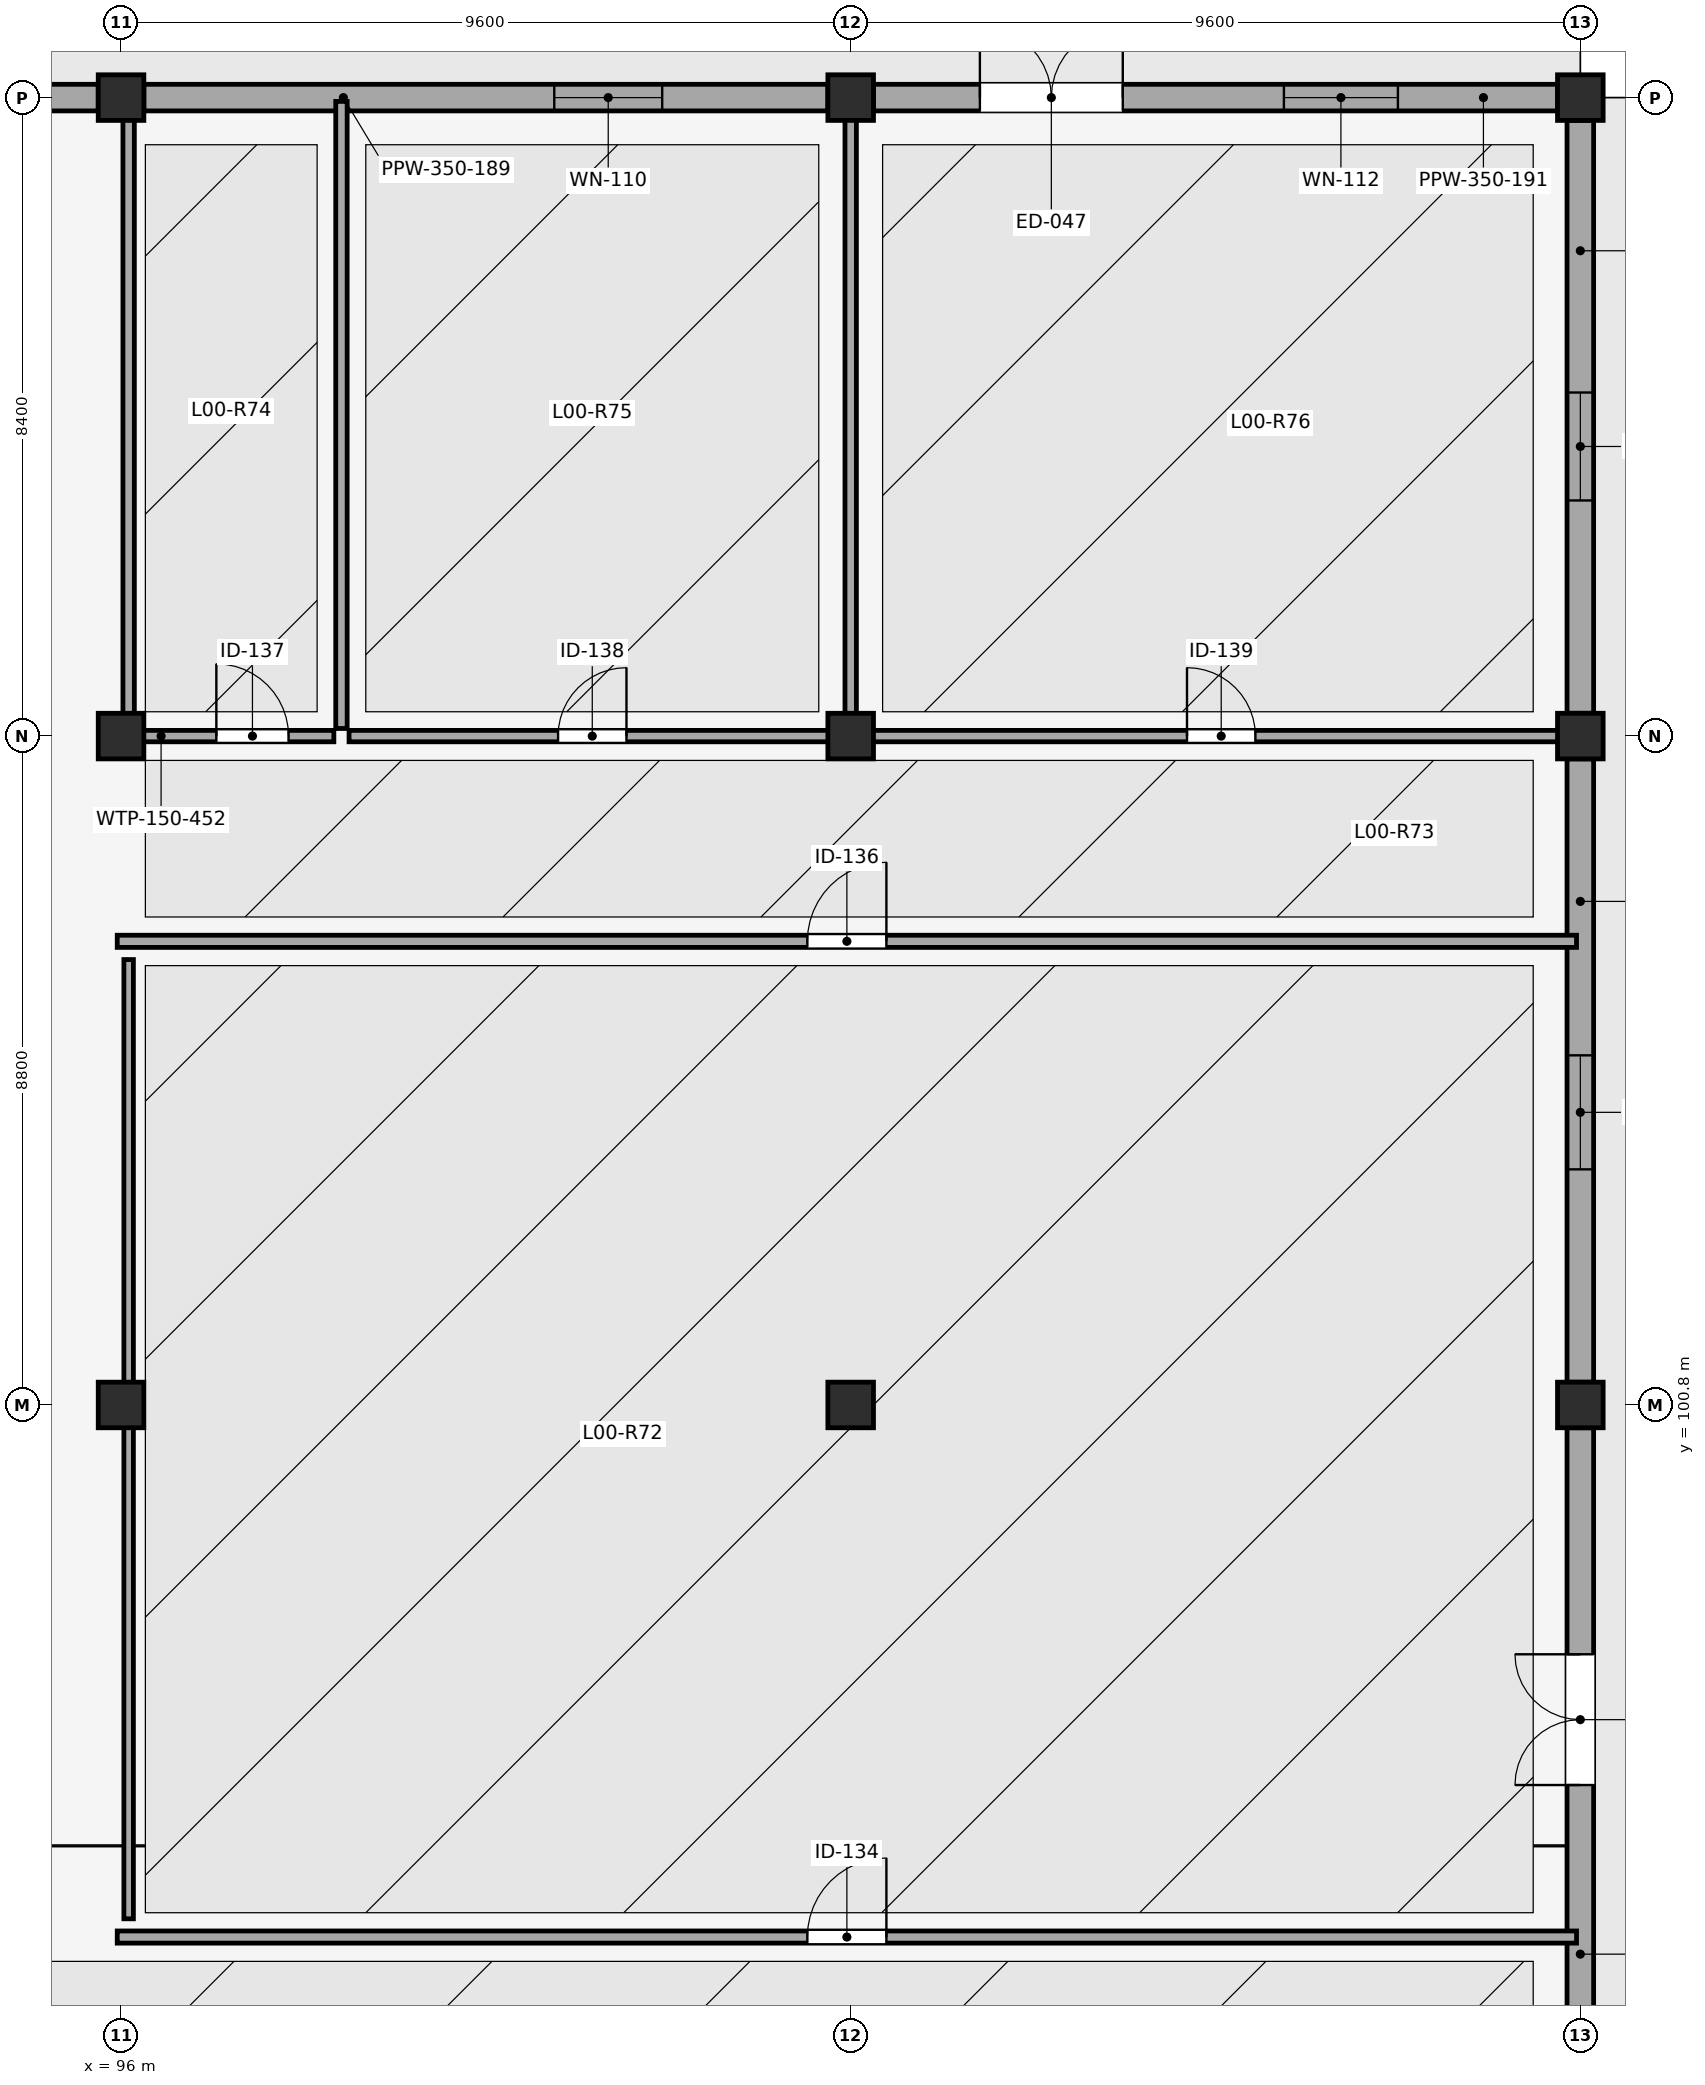
"""IFC4 building model, lengths in metres.
Left out: names, types, materials, properties, quantities, classifications, styles, units other than length and angle.
Written with IfcOpenShell. Run it as: python <this file> out.ifc"""

import sys

from ifc_helpers import new_model, si_unit, direction, frame, frame_2d, origin, origin_2d, place, context, subcontext, project, spatial, rectangle, extrude, element, fill, save


model = new_model("IFC4")
c1 = context("Model", 3, precision=1e-05, world=origin(), true_north=direction((0.0, 1.0)))
c2 = subcontext(c1, "Body", "Model", "MODEL_VIEW")
j1 = project(units=[si_unit("LENGTHUNIT", "METRE"), si_unit("PLANEANGLEUNIT", "RADIAN")], contexts=[c1])
p1 = place(None, origin())
s1 = spatial("IfcSite", under=j1, at=p1, CompositionType="ELEMENT")
p2 = place(p1, origin())
s2 = spatial("IfcBuilding", under=s1, at=p2, CompositionType="ELEMENT")
p3 = place(p2, origin())
s3 = spatial("IfcBuildingStorey", under=s2, at=p3, CompositionType="ELEMENT", Elevation=0.0)
for number, where, z_axis, x_axis in (
    (1, (96.0, 100.8, 0.0), (0.0, 0.0, 1.0), (1.0, 0.0, 0.0)),
    (2, (96.0, 109.6, 0.0), (0.0, 0.0, 1.0), (1.0, 0.0, 0.0)),
    (3, (96.0, 118.0, 0.0), (0.0, 0.0, 1.0), (1.0, 0.0, 0.0)),
    (4, (105.6, 100.8, 0.0), (0.0, 0.0, 1.0), (1.0, 0.0, 0.0)),
    (5, (105.6, 109.6, 0.0), (0.0, 0.0, 1.0), (1.0, 0.0, 0.0)),
    (6, (105.6, 118.0, 0.0), (0.0, 0.0, 1.0), (1.0, 0.0, 0.0)),
    (7, (115.2, 100.8, 0.0), (0.0, 0.0, 1.0), (1.0, 0.0, 0.0)),
    (8, (115.2, 109.6, 0.0), (0.0, 0.0, 1.0), (1.0, 0.0, 0.0)),
    (9, (115.2, 118.0, 0.0), (0.0, 0.0, 1.0), (1.0, 0.0, 0.0)),
):
    element("IfcColumn", number, at=place(p3, frame(where, z_axis=z_axis, x_axis=x_axis)), inside=s3, PredefinedType="COLUMN", context=c2, shape_type="SweptSolid", body=[
        extrude(rectangle(XDim=0.6, YDim=0.6, at=origin_2d()), origin(), (0.0, 0.0, 1.0), 4.8),
    ])
p4 = place(p3, frame((86.7, 118.0, 0.0), z_axis=(0.0, 0.0, 1.0), x_axis=(1.0, 0.0, 0.0)))
e10 = element("IfcWall", 10, at=p4, inside=s3, PredefinedType="SOLIDWALL", context=c2, shape_type="SweptSolid", body=[
    extrude(rectangle(XDim=9.0, YDim=0.35, at=frame_2d((4.5, 0.0))), origin(), (0.0, 0.0, 1.0), 4.1),
])
p5 = place(p4, frame((0.7, 0.0, 0.0)))
e11 = element("IfcOpeningElement", 11, at=p5, cuts=e10, PredefinedType="OPENING", context=c2, shape_type="SweptSolid", body=[
    extrude(rectangle(XDim=1.0, YDim=2.2, at=frame_2d((0.5, 1.1))), frame((0.0, 0.185, 0.0), z_axis=(0.0, -1.0, 0.0), x_axis=(1.0, 0.0, 0.0)), (0.0, 0.0, 1.0), 0.37),
])
p6 = place(p4, frame((5.4, 0.0, 1.1)))
e12 = element("IfcOpeningElement", 12, at=p6, cuts=e10, PredefinedType="OPENING", context=c2, shape_type="SweptSolid", body=[
    extrude(rectangle(XDim=1.5, YDim=1.6, at=frame_2d((0.75, 0.8))), frame((0.0, 0.185, 0.0), z_axis=(0.0, -1.0, 0.0), x_axis=(1.0, 0.0, 0.0)), (0.0, 0.0, 1.0), 0.37),
])
p7 = place(p3, frame((96.3, 118.0, 0.0), z_axis=(0.0, 0.0, 1.0), x_axis=(1.0, 0.0, 0.0)))
e13 = element("IfcWall", 13, at=p7, inside=s3, PredefinedType="SOLIDWALL", context=c2, shape_type="SweptSolid", body=[
    extrude(rectangle(XDim=9.0, YDim=0.35, at=frame_2d((4.5, 0.0))), origin(), (0.0, 0.0, 1.0), 4.1),
])
p8 = place(p7, frame((5.4, 0.0, 1.1)))
e14 = element("IfcOpeningElement", 14, at=p8, cuts=e13, PredefinedType="OPENING", context=c2, shape_type="SweptSolid", body=[
    extrude(rectangle(XDim=1.42, YDim=1.54, at=frame_2d((0.71, 0.77))), frame((0.0, 0.185, 0.0), z_axis=(0.0, -1.0, 0.0), x_axis=(1.0, 0.0, 0.0)), (0.0, 0.0, 1.0), 0.37),
])
p9 = place(p3, frame((105.9, 118.0, 0.0), z_axis=(0.0, 0.0, 1.0), x_axis=(1.0, 0.0, 0.0)))
e15 = element("IfcWall", 15, at=p9, inside=s3, PredefinedType="SOLIDWALL", context=c2, shape_type="SweptSolid", body=[
    extrude(rectangle(XDim=9.0, YDim=0.35, at=frame_2d((4.5, 0.0))), origin(), (0.0, 0.0, 1.0), 4.1),
])
p10 = place(p9, frame((1.4, 0.0, 0.0)))
e16 = element("IfcOpeningElement", 16, at=p10, cuts=e15, PredefinedType="OPENING", context=c2, shape_type="SweptSolid", body=[
    extrude(rectangle(XDim=1.88, YDim=2.31, at=frame_2d((0.94, 1.155))), frame((0.0, 0.185, 0.0), z_axis=(0.0, -1.0, 0.0), x_axis=(1.0, 0.0, 0.0)), (0.0, 0.0, 1.0), 0.37),
])
p11 = place(p9, frame((5.4, 0.0, 1.1)))
e17 = element("IfcOpeningElement", 17, at=p11, cuts=e15, PredefinedType="OPENING", context=c2, shape_type="SweptSolid", body=[
    extrude(rectangle(XDim=1.5, YDim=1.6, at=frame_2d((0.75, 0.8))), frame((0.0, 0.185, 0.0), z_axis=(0.0, -1.0, 0.0), x_axis=(1.0, 0.0, 0.0)), (0.0, 0.0, 1.0), 0.37),
])
p12 = place(p3, frame((115.2, 91.5, 0.0), z_axis=(0.0, 0.0, 1.0), x_axis=(0.0, 1.0, 0.0)))
e18 = element("IfcWall", 18, at=p12, inside=s3, PredefinedType="SOLIDWALL", context=c2, shape_type="SweptSolid", body=[
    extrude(rectangle(XDim=9.0, YDim=0.35, at=frame_2d((4.5, 0.0))), origin(), (0.0, 0.0, 1.0), 4.1),
])
p13 = place(p12, frame((4.3, 0.0, 0.0)))
e19 = element("IfcOpeningElement", 19, at=p13, cuts=e18, PredefinedType="OPENING", context=c2, shape_type="SweptSolid", body=[
    extrude(rectangle(XDim=1.72, YDim=2.34, at=frame_2d((0.86, 1.17))), frame((0.0, 0.185, 0.0), z_axis=(0.0, -1.0, 0.0), x_axis=(1.0, 0.0, 0.0)), (0.0, 0.0, 1.0), 0.37),
])
p14 = place(p3, frame((115.2, 101.1, 0.0), z_axis=(0.0, 0.0, 1.0), x_axis=(0.0, 1.0, 0.0)))
e20 = element("IfcWall", 20, at=p14, inside=s3, PredefinedType="SOLIDWALL", context=c2, shape_type="SweptSolid", body=[
    extrude(rectangle(XDim=8.2, YDim=0.35, at=frame_2d((4.1, 0.0))), origin(), (0.0, 0.0, 1.0), 4.1),
])
p15 = place(p14, frame((2.8, 0.0, 1.15)))
e21 = element("IfcOpeningElement", 21, at=p15, cuts=e20, PredefinedType="OPENING", context=c2, shape_type="SweptSolid", body=[
    extrude(rectangle(XDim=1.5, YDim=1.6, at=frame_2d((0.75, 0.8))), frame((0.0, 0.185, 0.0), z_axis=(0.0, -1.0, 0.0), x_axis=(1.0, 0.0, 0.0)), (0.0, 0.0, 1.0), 0.37),
])
p16 = place(p3, frame((115.2, 109.9, 0.0), z_axis=(0.0, 0.0, 1.0), x_axis=(0.0, 1.0, 0.0)))
e22 = element("IfcWall", 22, at=p16, inside=s3, PredefinedType="SOLIDWALL", context=c2, shape_type="SweptSolid", body=[
    extrude(rectangle(XDim=7.8, YDim=0.35, at=frame_2d((3.9, 0.0))), origin(), (0.0, 0.0, 1.0), 4.1),
])
p17 = place(p16, frame((2.8, 0.0, 1.15)))
e23 = element("IfcOpeningElement", 23, at=p17, cuts=e22, PredefinedType="OPENING", context=c2, shape_type="SweptSolid", body=[
    extrude(rectangle(XDim=1.42, YDim=1.54, at=frame_2d((0.71, 0.77))), frame((0.0, 0.185, 0.0), z_axis=(0.0, -1.0, 0.0), x_axis=(1.0, 0.0, 0.0)), (0.0, 0.0, 1.0), 0.37),
])
p18 = place(p3, frame((95.95, 93.8, 0.0), z_axis=(0.0, 0.0, 1.0), x_axis=(1.0, 0.0, 0.0)))
e24 = element("IfcWall", 24, at=p18, inside=s3, PredefinedType="PARTITIONING", context=c2, shape_type="SweptSolid", body=[
    extrude(rectangle(XDim=19.2, YDim=0.16, at=frame_2d((9.6, 0.0))), origin(), (0.0, 0.0, 1.0), 4.42),
])
p19 = place(p18, frame((9.08, 0.0, 0.0)))
e25 = element("IfcOpeningElement", 25, at=p19, cuts=e24, PredefinedType="OPENING", context=c2, shape_type="SweptSolid", body=[
    extrude(rectangle(XDim=1.04, YDim=2.18, at=frame_2d((0.52, 1.09))), frame((0.0, 0.09, 0.0), z_axis=(0.0, -1.0, 0.0), x_axis=(1.0, 0.0, 0.0)), (0.0, 0.0, 1.0), 0.18),
])
p20 = place(p3, frame((95.95, 106.9, 0.0), z_axis=(0.0, 0.0, 1.0), x_axis=(1.0, 0.0, 0.0)))
e26 = element("IfcWall", 26, at=p20, inside=s3, PredefinedType="PARTITIONING", context=c2, shape_type="SweptSolid", body=[
    extrude(rectangle(XDim=19.2, YDim=0.16, at=frame_2d((9.6, 0.0))), origin(), (0.0, 0.0, 1.0), 4.0),
])
p21 = place(p20, frame((9.08, 0.0, 0.0)))
e27 = element("IfcOpeningElement", 27, at=p21, cuts=e26, PredefinedType="OPENING", context=c2, shape_type="SweptSolid", body=[
    extrude(rectangle(XDim=1.04, YDim=2.18, at=frame_2d((0.52, 1.09))), frame((0.0, 0.09, 0.0), z_axis=(0.0, -1.0, 0.0), x_axis=(1.0, 0.0, 0.0)), (0.0, 0.0, 1.0), 0.18),
])
p22 = place(p3, frame((95.95, 109.6, 0.0), z_axis=(0.0, 0.0, 1.0), x_axis=(1.0, 0.0, 0.0)))
e28 = element("IfcWall", 28, at=p22, inside=s3, PredefinedType="PARTITIONING", context=c2, shape_type="SweptSolid", body=[
    extrude(rectangle(XDim=2.85, YDim=0.15, at=frame_2d((1.425, 0.0))), origin(), (0.0, 0.0, 1.0), 3.841),
])
p23 = place(p22, frame((1.304, 0.0, 0.0)))
e29 = element("IfcOpeningElement", 29, at=p23, cuts=e28, PredefinedType="OPENING", context=c2, shape_type="SweptSolid", body=[
    extrude(rectangle(XDim=0.95, YDim=2.15, at=frame_2d((0.475, 1.075))), frame((0.0, 0.085, 0.0), z_axis=(0.0, -1.0, 0.0), x_axis=(1.0, 0.0, 0.0)), (0.0, 0.0, 1.0), 0.17),
])
p24 = place(p3, frame((99.0, 109.6, 0.0), z_axis=(0.0, 0.0, 1.0), x_axis=(1.0, 0.0, 0.0)))
e30 = element("IfcWall", 30, at=p24, inside=s3, PredefinedType="PARTITIONING", context=c2, shape_type="SweptSolid", body=[
    extrude(rectangle(XDim=6.4, YDim=0.15, at=frame_2d((3.2, 0.0))), origin(), (0.0, 0.0, 1.0), 3.841),
])
p25 = place(p24, frame((2.75, 0.0, 0.0)))
e31 = element("IfcOpeningElement", 31, at=p25, cuts=e30, PredefinedType="OPENING", context=c2, shape_type="SweptSolid", body=[
    extrude(rectangle(XDim=0.9, YDim=2.15, at=frame_2d((0.45, 1.075))), frame((0.0, 0.085, 0.0), z_axis=(0.0, -1.0, 0.0), x_axis=(1.0, 0.0, 0.0)), (0.0, 0.0, 1.0), 0.17),
])
p26 = place(p3, frame((105.8, 109.6, 0.0), z_axis=(0.0, 0.0, 1.0), x_axis=(1.0, 0.0, 0.0)))
e32 = element("IfcWall", 32, at=p26, inside=s3, PredefinedType="PARTITIONING", context=c2, shape_type="SweptSolid", body=[
    extrude(rectangle(XDim=9.35, YDim=0.15, at=frame_2d((4.675, 0.0))), origin(), (0.0, 0.0, 1.0), 3.841),
])
p27 = place(p26, frame((4.225, 0.0, 0.0)))
e33 = element("IfcOpeningElement", 33, at=p27, cuts=e32, PredefinedType="OPENING", context=c2, shape_type="SweptSolid", body=[
    extrude(rectangle(XDim=0.9, YDim=2.15, at=frame_2d((0.45, 1.075))), frame((0.0, 0.085, 0.0), z_axis=(0.0, -1.0, 0.0), x_axis=(1.0, 0.0, 0.0)), (0.0, 0.0, 1.0), 0.17),
])
p28 = place(p3, frame((98.9, 109.7, 0.0), z_axis=(0.0, 0.0, 1.0), x_axis=(0.0, 1.0, 0.0)))
e34 = element("IfcWall", 34, at=p28, inside=s3, PredefinedType="PARTITIONING", context=c2, shape_type="SweptSolid", body=[
    extrude(rectangle(XDim=8.25, YDim=0.15, at=frame_2d((4.125, 0.0))), origin(), (0.0, 0.0, 1.0), 4.42),
])
p29 = place(p3, frame((105.6, 109.7, 0.0), z_axis=(0.0, 0.0, 1.0), x_axis=(0.0, 1.0, 0.0)))
e35 = element("IfcWall", 35, at=p29, inside=s3, PredefinedType="PARTITIONING", context=c2, shape_type="SweptSolid", body=[
    extrude(rectangle(XDim=8.25, YDim=0.15, at=frame_2d((4.125, 0.0))), origin(), (0.0, 0.0, 1.0), 3.92),
])
p30 = place(p3, frame((96.1, 94.04, 0.0), z_axis=(0.0, 0.0, 1.0), x_axis=(0.0, 1.0, 0.0)))
e36 = element("IfcWall", 36, at=p30, inside=s3, PredefinedType="PARTITIONING", context=c2, shape_type="SweptSolid", body=[
    extrude(rectangle(XDim=12.62, YDim=0.125, at=frame_2d((6.31, 0.0))), origin(), (0.0, 0.0, 1.0), 3.92),
])
p31 = place(p3, frame((96.1, 109.84, 0.0), z_axis=(0.0, 0.0, 1.0), x_axis=(0.0, 1.0, 0.0)))
e37 = element("IfcWall", 37, at=p31, inside=s3, PredefinedType="PARTITIONING", context=c2, shape_type="SweptSolid", body=[
    extrude(rectangle(XDim=8.11, YDim=0.15, at=frame_2d((4.055, 0.0))), origin(), (0.0, 0.0, 1.0), 3.92),
])
p32 = place(p8, origin())
e38 = element("IfcWindow", 38, at=p32, inside=s3, PartitioningType="SINGLE_PANEL", PredefinedType="WINDOW", context=c2, shape_type="SweptSolid", body=[
    extrude(rectangle(XDim=1.42, YDim=1.54, at=frame_2d((0.71, 0.77))), frame((0.0, 0.03, 0.0), z_axis=(0.0, -1.0, 0.0), x_axis=(1.0, 0.0, 0.0)), (0.0, 0.0, 1.0), 0.06),
])
fill(e14, e38)
p33 = place(p10, origin())
e39 = element("IfcDoor", 39, at=p33, inside=s3, OperationType="DOUBLE_DOOR_SINGLE_SWING", PredefinedType="DOOR", context=c2, shape_type="SweptSolid", body=[
    extrude(rectangle(XDim=1.88, YDim=2.31, at=frame_2d((0.94, 1.155))), frame((0.0, 0.025, 0.0), z_axis=(0.0, -1.0, 0.0), x_axis=(1.0, 0.0, 0.0)), (0.0, 0.0, 1.0), 0.05),
])
fill(e16, e39)
p34 = place(p11, origin())
e40 = element("IfcWindow", 40, at=p34, inside=s3, PartitioningType="SINGLE_PANEL", PredefinedType="WINDOW", context=c2, shape_type="SweptSolid", body=[
    extrude(rectangle(XDim=1.5, YDim=1.6, at=frame_2d((0.75, 0.8))), frame((0.0, 0.03, 0.0), z_axis=(0.0, -1.0, 0.0), x_axis=(1.0, 0.0, 0.0)), (0.0, 0.0, 1.0), 0.06),
])
fill(e17, e40)
p35 = place(p13, origin())
e41 = element("IfcDoor", 41, at=p35, inside=s3, OperationType="DOUBLE_DOOR_SINGLE_SWING", PredefinedType="DOOR", context=c2, shape_type="SweptSolid", body=[
    extrude(rectangle(XDim=1.72, YDim=2.34, at=frame_2d((0.86, 1.17))), frame((0.0, 0.025, 0.0), z_axis=(0.0, -1.0, 0.0), x_axis=(1.0, 0.0, 0.0)), (0.0, 0.0, 1.0), 0.05),
])
fill(e19, e41)
p36 = place(p15, origin())
e42 = element("IfcWindow", 42, at=p36, inside=s3, PartitioningType="SINGLE_PANEL", PredefinedType="WINDOW", context=c2, shape_type="SweptSolid", body=[
    extrude(rectangle(XDim=1.5, YDim=1.6, at=frame_2d((0.75, 0.8))), frame((0.0, 0.03, 0.0), z_axis=(0.0, -1.0, 0.0), x_axis=(1.0, 0.0, 0.0)), (0.0, 0.0, 1.0), 0.06),
])
fill(e21, e42)
p37 = place(p17, origin())
e43 = element("IfcWindow", 43, at=p37, inside=s3, PartitioningType="SINGLE_PANEL", PredefinedType="WINDOW", context=c2, shape_type="SweptSolid", body=[
    extrude(rectangle(XDim=1.42, YDim=1.54, at=frame_2d((0.71, 0.77))), frame((0.0, 0.03, 0.0), z_axis=(0.0, -1.0, 0.0), x_axis=(1.0, 0.0, 0.0)), (0.0, 0.0, 1.0), 0.06),
])
fill(e23, e43)
p38 = place(p19, origin())
e44 = element("IfcDoor", 44, at=p38, inside=s3, OperationType="SINGLE_SWING_RIGHT", PredefinedType="DOOR", context=c2, shape_type="SweptSolid", body=[
    extrude(rectangle(XDim=1.04, YDim=2.18, at=frame_2d((0.52, 1.09))), frame((0.0, 0.025, 0.0), z_axis=(0.0, -1.0, 0.0), x_axis=(1.0, 0.0, 0.0)), (0.0, 0.0, 1.0), 0.05),
])
fill(e25, e44)
p39 = place(p21, origin())
e45 = element("IfcDoor", 45, at=p39, inside=s3, OperationType="SINGLE_SWING_RIGHT", PredefinedType="DOOR", context=c2, shape_type="SweptSolid", body=[
    extrude(rectangle(XDim=1.04, YDim=2.18, at=frame_2d((0.52, 1.09))), frame((0.0, 0.025, 0.0), z_axis=(0.0, -1.0, 0.0), x_axis=(1.0, 0.0, 0.0)), (0.0, 0.0, 1.0), 0.05),
])
fill(e27, e45)
p40 = place(p23, origin())
e46 = element("IfcDoor", 46, at=p40, inside=s3, OperationType="SINGLE_SWING_LEFT", PredefinedType="DOOR", context=c2, shape_type="SweptSolid", body=[
    extrude(rectangle(XDim=0.95, YDim=2.15, at=frame_2d((0.475, 1.075))), frame((0.0, 0.025, 0.0), z_axis=(0.0, -1.0, 0.0), x_axis=(1.0, 0.0, 0.0)), (0.0, 0.0, 1.0), 0.05),
])
fill(e29, e46)
p41 = place(p25, origin())
e47 = element("IfcDoor", 47, at=p41, inside=s3, OperationType="SINGLE_SWING_RIGHT", PredefinedType="DOOR", context=c2, shape_type="SweptSolid", body=[
    extrude(rectangle(XDim=0.9, YDim=2.15, at=frame_2d((0.45, 1.075))), frame((0.0, 0.025, 0.0), z_axis=(0.0, -1.0, 0.0), x_axis=(1.0, 0.0, 0.0)), (0.0, 0.0, 1.0), 0.05),
])
fill(e31, e47)
p42 = place(p27, origin())
e48 = element("IfcDoor", 48, at=p42, inside=s3, OperationType="SINGLE_SWING_LEFT", PredefinedType="DOOR", context=c2, shape_type="SweptSolid", body=[
    extrude(rectangle(XDim=0.9, YDim=2.15, at=frame_2d((0.45, 1.075))), frame((0.0, 0.025, 0.0), z_axis=(0.0, -1.0, 0.0), x_axis=(1.0, 0.0, 0.0)), (0.0, 0.0, 1.0), 0.05),
])
fill(e33, e48)
save(model, sys.argv[1])
